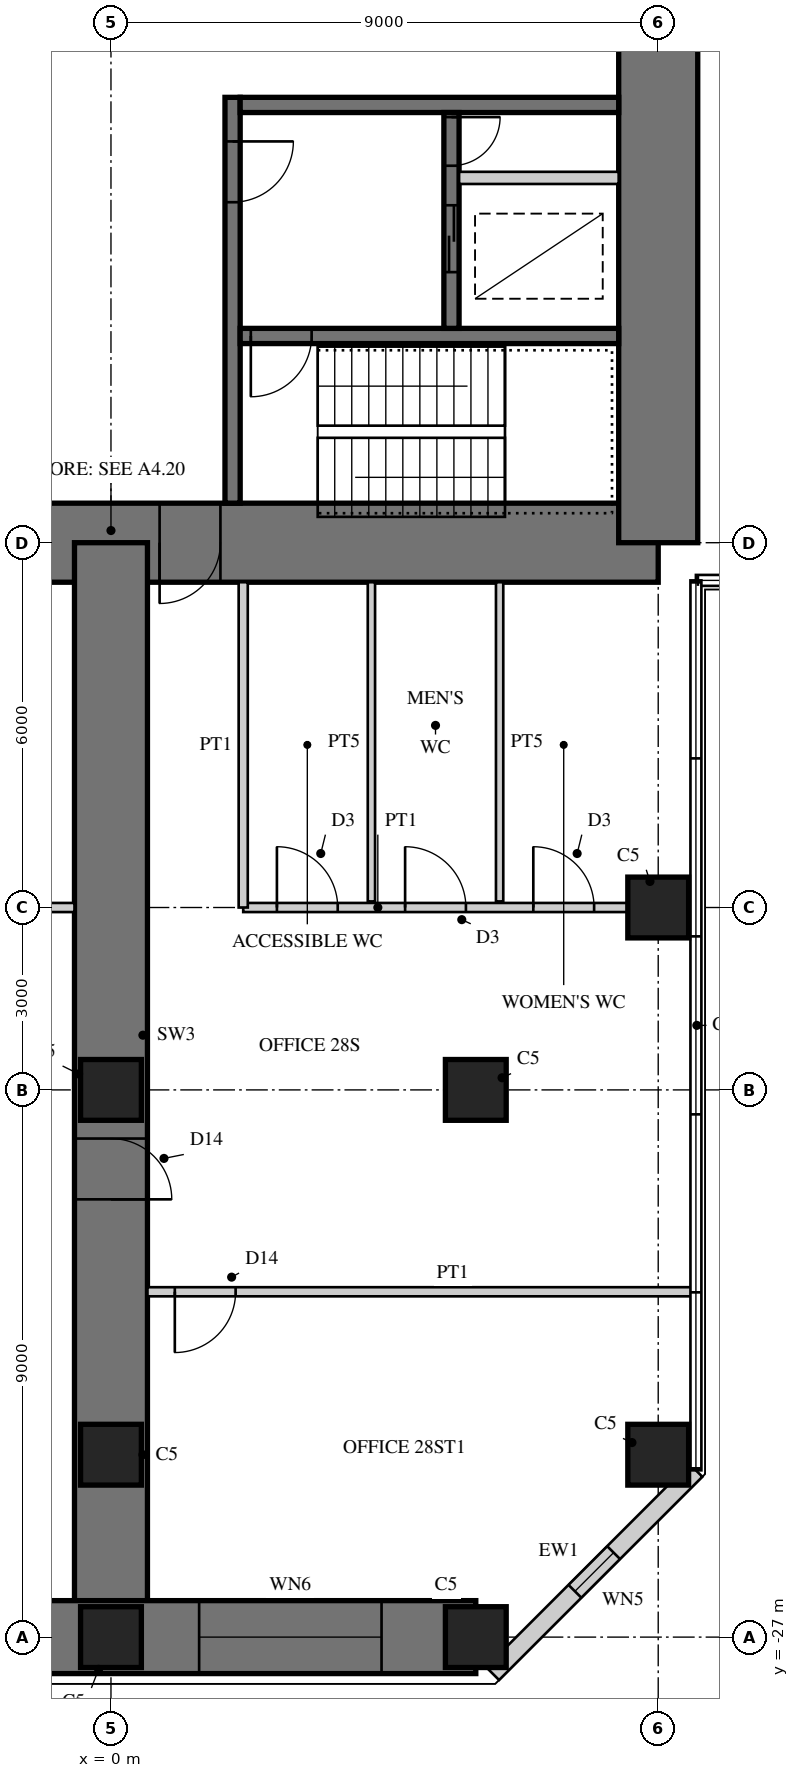
"""IFC4 building model, lengths in metres.
Left out: names, types, materials, properties, quantities, classifications, styles, units other than length and angle.
Written with IfcOpenShell. Run it as: python <this file> out.ifc"""

import sys

from ifc_helpers import new_model, si_unit, direction, frame, frame_2d, origin, origin_2d, place, context, subcontext, project, spatial, rectangle, hollow_rectangle, extrude, element, fill, save


model = new_model("IFC4")
c1 = context("Model", 3, precision=1e-05, world=origin(), true_north=direction((0.0, 1.0)))
c2 = subcontext(c1, "Body", "Model", "MODEL_VIEW")
j1 = project(units=[si_unit("LENGTHUNIT", "METRE"), si_unit("PLANEANGLEUNIT", "RADIAN")], contexts=[c1])
p1 = place(None, origin())
s1 = spatial("IfcSite", under=j1, at=p1, CompositionType="ELEMENT")
p2 = place(p1, origin())
s2 = spatial("IfcBuilding", under=s1, at=p2, CompositionType="ELEMENT")
p3 = place(p2, frame((0.0, 0.0, 116.5)))
s3 = spatial("IfcBuildingStorey", under=s2, at=p3, CompositionType="ELEMENT", Elevation=116.5)
p4 = place(p3, frame((-9.0, -9.0, 0.0), z_axis=(0.0, 0.0, 1.0), x_axis=(1.0, 0.0, 0.0)))
e1 = element("IfcWall", 1, at=p4, inside=s3, PredefinedType="SHEAR", context=c2, shape_type="SweptSolid", body=[
    extrude(rectangle(XDim=18.0, YDim=1.3, at=frame_2d((9.0, 0.0))), origin(), (0.0, 0.0, 1.0), 4.0),
])
p5 = place(p4, frame((9.8, 0.0, 0.0)))
e2 = element("IfcOpeningElement", 2, at=p5, cuts=e1, PredefinedType="OPENING", context=c2, shape_type="SweptSolid", body=[
    extrude(rectangle(XDim=1.0, YDim=2.4, at=frame_2d((0.5, 1.2))), frame((0.0, 0.66, 0.0), z_axis=(0.0, -1.0, 0.0), x_axis=(1.0, 0.0, 0.0)), (0.0, 0.0, 1.0), 1.32),
])
p6 = place(p3, frame((9.0, -9.0, 0.0), z_axis=(0.0, 0.0, 1.0), x_axis=(0.0, 1.0, 0.0)))
e3 = element("IfcWall", 3, at=p6, inside=s3, PredefinedType="SHEAR", context=c2, shape_type="SweptSolid", body=[
    extrude(rectangle(XDim=18.0, YDim=1.3, at=frame_2d((9.0, 0.0))), origin(), (0.0, 0.0, 1.0), 4.0),
])
p7 = place(p6, frame((9.8, 0.0, 0.0)))
e4 = element("IfcOpeningElement", 4, at=p7, cuts=e3, PredefinedType="OPENING", context=c2, shape_type="SweptSolid", body=[
    extrude(rectangle(XDim=1.0, YDim=2.4, at=frame_2d((0.5, 1.2))), frame((0.0, 0.66, 0.0), z_axis=(0.0, -1.0, 0.0), x_axis=(1.0, 0.0, 0.0)), (0.0, 0.0, 1.0), 1.32),
])
p8 = place(p3, frame((2.0, -1.675, 0.0), z_axis=(0.0, 0.0, 1.0), x_axis=(0.0, -1.0, 0.0)))
e5 = element("IfcWall", 5, at=p8, inside=s3, PredefinedType="SHEAR", context=c2, shape_type="SweptSolid", body=[
    extrude(rectangle(XDim=6.675, YDim=0.25, at=frame_2d((3.337, 0.0))), origin(), (0.0, 0.0, 1.0), 4.0),
])
p9 = place(p8, frame((0.725, 0.0, 0.0)))
e6 = element("IfcOpeningElement", 6, at=p9, cuts=e5, PredefinedType="OPENING", context=c2, shape_type="SweptSolid", body=[
    extrude(rectangle(XDim=1.0, YDim=2.1, at=frame_2d((0.5, 1.05))), frame((0.0, 0.135, 0.0), z_axis=(0.0, -1.0, 0.0), x_axis=(1.0, 0.0, 0.0)), (0.0, 0.0, 1.0), 0.27),
])
p10 = place(p3, frame((2.125, -1.8, 0.0), z_axis=(0.0, 0.0, 1.0), x_axis=(1.0, 0.0, 0.0)))
e7 = element("IfcWall", 7, at=p10, inside=s3, PredefinedType="SHEAR", context=c2, shape_type="SweptSolid", body=[
    extrude(rectangle(XDim=6.225, YDim=0.25, at=frame_2d((3.113, 0.0))), origin(), (0.0, 0.0, 1.0), 4.0),
])
p11 = place(p3, frame((2.125, -5.6, 0.0), z_axis=(0.0, 0.0, 1.0), x_axis=(1.0, 0.0, 0.0)))
e8 = element("IfcWall", 8, at=p11, inside=s3, PredefinedType="SHEAR", context=c2, shape_type="SweptSolid", body=[
    extrude(rectangle(XDim=6.225, YDim=0.25, at=frame_2d((3.113, 0.0))), origin(), (0.0, 0.0, 1.0), 4.0),
])
p12 = place(p11, frame((0.175, 0.0, 0.0)))
e9 = element("IfcOpeningElement", 9, at=p12, cuts=e8, PredefinedType="OPENING", context=c2, shape_type="SweptSolid", body=[
    extrude(rectangle(XDim=1.0, YDim=2.1, at=frame_2d((0.5, 1.05))), frame((0.0, 0.135, 0.0), z_axis=(0.0, -1.0, 0.0), x_axis=(1.0, 0.0, 0.0)), (0.0, 0.0, 1.0), 0.27),
])
p13 = place(p3, frame((5.6, -1.925, 0.0), z_axis=(0.0, 0.0, 1.0), x_axis=(0.0, -1.0, 0.0)))
e10 = element("IfcWall", 10, at=p13, inside=s3, PredefinedType="SHEAR", context=c2, shape_type="SweptSolid", body=[
    extrude(rectangle(XDim=3.55, YDim=0.25, at=frame_2d((1.775, 0.0))), origin(), (0.0, 0.0, 1.0), 4.0),
])
p14 = place(p13, frame((1.525, 0.0, 0.0)))
e11 = element("IfcOpeningElement", 11, at=p14, cuts=e10, PredefinedType="OPENING", context=c2, shape_type="SweptSolid", body=[
    extrude(rectangle(XDim=1.1, YDim=2.2, at=frame_2d((0.55, 1.1))), frame((0.0, 0.135, 0.0), z_axis=(0.0, -1.0, 0.0), x_axis=(1.0, 0.0, 0.0)), (0.0, 0.0, 1.0), 0.27),
])
p15 = place(p13, frame((0.075, 0.0, 0.0)))
e12 = element("IfcOpeningElement", 12, at=p15, cuts=e10, PredefinedType="OPENING", context=c2, shape_type="SweptSolid", body=[
    extrude(rectangle(XDim=0.8, YDim=2.1, at=frame_2d((0.4, 1.05))), frame((0.0, 0.135, 0.0), z_axis=(0.0, -1.0, 0.0), x_axis=(1.0, 0.0, 0.0)), (0.0, 0.0, 1.0), 0.27),
])
p16 = place(p3, frame((5.725, -3.0, 0.0), z_axis=(0.0, 0.0, 1.0), x_axis=(1.0, 0.0, 0.0)))
e13 = element("IfcWall", 13, at=p16, inside=s3, PredefinedType="PARTITIONING", context=c2, shape_type="SweptSolid", body=[
    extrude(rectangle(XDim=2.625, YDim=0.2, at=frame_2d((1.312, 0.0))), origin(), (0.0, 0.0, 1.0), 4.0),
])
p17 = place(p3, frame((0.0, -9.0, 0.0), z_axis=(0.0, 0.0, 1.0), x_axis=(0.0, -1.0, 0.0)))
e14 = element("IfcWall", 14, at=p17, inside=s3, PredefinedType="SHEAR", context=c2, shape_type="SweptSolid", body=[
    extrude(rectangle(XDim=18.0, YDim=1.2, at=frame_2d((9.0, 0.0))), origin(), (0.0, 0.0, 1.0), 4.0),
])
p18 = place(p17, frame((9.8, 0.0, 0.0)))
e15 = element("IfcOpeningElement", 15, at=p18, cuts=e14, PredefinedType="OPENING", context=c2, shape_type="SweptSolid", body=[
    extrude(rectangle(XDim=1.0, YDim=2.2, at=frame_2d((0.5, 1.1))), frame((0.0, 0.61, 0.0), z_axis=(0.0, -1.0, 0.0), x_axis=(1.0, 0.0, 0.0)), (0.0, 0.0, 1.0), 1.22),
])
p19 = place(p3, frame((-6.0, -27.0, 0.0), z_axis=(0.0, 0.0, 1.0), x_axis=(1.0, 0.0, 0.0)))
e16 = element("IfcWall", 16, at=p19, inside=s3, PredefinedType="SHEAR", context=c2, shape_type="SweptSolid", body=[
    extrude(rectangle(XDim=12.0, YDim=1.2, at=frame_2d((6.0, 0.0))), origin(), (0.0, 0.0, 1.0), 4.0),
])
p20 = place(p19, frame((1.55, 0.0, 0.6)))
e17 = element("IfcOpeningElement", 17, at=p20, cuts=e16, PredefinedType="OPENING", context=c2, shape_type="SweptSolid", body=[
    extrude(rectangle(XDim=3.0, YDim=2.4, at=frame_2d((1.5, 1.2))), frame((0.0, 0.61, 0.0), z_axis=(0.0, -1.0, 0.0), x_axis=(1.0, 0.0, 0.0)), (0.0, 0.0, 1.0), 1.22),
])
p21 = place(p19, frame((7.45, 0.0, 0.6)))
e18 = element("IfcOpeningElement", 18, at=p21, cuts=e16, PredefinedType="OPENING", context=c2, shape_type="SweptSolid", body=[
    extrude(rectangle(XDim=3.0, YDim=2.4, at=frame_2d((1.5, 1.2))), frame((0.0, 0.61, 0.0), z_axis=(0.0, -1.0, 0.0), x_axis=(1.0, 0.0, 0.0)), (0.0, 0.0, 1.0), 1.22),
])
for number, where, z_axis, x_axis in (
    (19, (9.0, -15.0, 0.0), (0.0, 0.0, 1.0), (1.0, 0.0, 0.0)),
    (20, (9.0, -24.0, 0.0), (0.0, 0.0, 1.0), (1.0, 0.0, 0.0)),
    (21, (0.0, -27.0, 0.0), (0.0, 0.0, 1.0), (1.0, 0.0, 0.0)),
    (22, (6.0, -27.0, 0.0), (0.0, 0.0, 1.0), (1.0, 0.0, 0.0)),
    (23, (0.0, -18.0, 0.0), (0.0, 0.0, 1.0), (1.0, 0.0, 0.0)),
    (24, (6.0, -18.0, 0.0), (0.0, 0.0, 1.0), (1.0, 0.0, 0.0)),
    (25, (0.0, -24.0, 0.0), (0.0, 0.0, 1.0), (1.0, 0.0, 0.0)),
):
    element("IfcColumn", number, at=place(p3, frame(where, z_axis=z_axis, x_axis=x_axis)), inside=s3, PredefinedType="COLUMN", context=c2, shape_type="SweptSolid", body=[
        extrude(rectangle(XDim=1.0, YDim=1.0, at=origin_2d()), origin(), (0.0, 0.0, 1.0), 4.0),
    ])
p22 = place(p3, frame((6.277, -27.6, 0.0), z_axis=(0.0, 0.0, 1.0), x_axis=(0.707106781187, 0.707106781187, 0.0)))
e26 = element("IfcWall", 26, at=p22, inside=s3, PredefinedType="SOLIDWALL", context=c2, shape_type="SweptSolid", body=[
    extrude(rectangle(XDim=4.728, YDim=0.3, at=frame_2d((2.364, 0.0))), origin(), (0.0, 0.0, 1.0), 3.8),
])
p23 = place(p22, frame((1.914, 0.0, 0.3)))
e27 = element("IfcOpeningElement", 27, at=p23, cuts=e26, PredefinedType="OPENING", context=c2, shape_type="SweptSolid", body=[
    extrude(rectangle(XDim=0.9, YDim=2.4, at=frame_2d((0.45, 1.2))), frame((0.0, 0.16, 0.0), z_axis=(0.0, -1.0, 0.0), x_axis=(1.0, 0.0, 0.0)), (0.0, 0.0, 1.0), 0.32),
])
p24 = place(p3, frame((2.175, -15.0, 0.0), z_axis=(0.0, 0.0, 1.0), x_axis=(1.0, 0.0, 0.0)))
e28 = element("IfcWall", 28, at=p24, inside=s3, PredefinedType="PARTITIONING", context=c2, shape_type="SweptSolid", body=[
    extrude(rectangle(XDim=6.325, YDim=0.15, at=frame_2d((3.163, 0.0))), origin(), (0.0, 0.0, 1.0), 3.0),
])
p25 = place(p24, frame((0.554, 0.0, 0.0)))
e29 = element("IfcOpeningElement", 29, at=p25, cuts=e28, PredefinedType="OPENING", context=c2, shape_type="SweptSolid", body=[
    extrude(rectangle(XDim=1.0, YDim=2.1, at=frame_2d((0.5, 1.05))), frame((0.0, 0.085, 0.0), z_axis=(0.0, -1.0, 0.0), x_axis=(1.0, 0.0, 0.0)), (0.0, 0.0, 1.0), 0.17),
])
p26 = place(p24, frame((2.663, 0.0, 0.0)))
e30 = element("IfcOpeningElement", 30, at=p26, cuts=e28, PredefinedType="OPENING", context=c2, shape_type="SweptSolid", body=[
    extrude(rectangle(XDim=1.0, YDim=2.1, at=frame_2d((0.5, 1.05))), frame((0.0, 0.085, 0.0), z_axis=(0.0, -1.0, 0.0), x_axis=(1.0, 0.0, 0.0)), (0.0, 0.0, 1.0), 0.17),
])
p27 = place(p24, frame((4.771, 0.0, 0.0)))
e31 = element("IfcOpeningElement", 31, at=p27, cuts=e28, PredefinedType="OPENING", context=c2, shape_type="SweptSolid", body=[
    extrude(rectangle(XDim=1.0, YDim=2.1, at=frame_2d((0.5, 1.05))), frame((0.0, 0.085, 0.0), z_axis=(0.0, -1.0, 0.0), x_axis=(1.0, 0.0, 0.0)), (0.0, 0.0, 1.0), 0.17),
])
p28 = place(p3, frame((2.175, -9.65, 0.0), z_axis=(0.0, 0.0, 1.0), x_axis=(0.0, -1.0, 0.0)))
e32 = element("IfcWall", 32, at=p28, inside=s3, PredefinedType="PARTITIONING", context=c2, shape_type="SweptSolid", body=[
    extrude(rectangle(XDim=5.35, YDim=0.15, at=frame_2d((2.675, 0.0))), origin(), (0.0, 0.0, 1.0), 3.8),
])
for number, where, z_axis, x_axis in (
    (33, (4.283, -9.65, 0.0), (0.0, 0.0, 1.0), (0.0, -1.0, 0.0)),
    (34, (6.392, -9.65, 0.0), (0.0, 0.0, 1.0), (0.0, -1.0, 0.0)),
):
    element("IfcWall", number, at=place(p3, frame(where, z_axis=z_axis, x_axis=x_axis)), inside=s3, PredefinedType="PLUMBINGWALL", context=c2, shape_type="SweptSolid", body=[
        extrude(rectangle(XDim=5.25, YDim=0.12, at=frame_2d((2.625, 0.0))), origin(), (0.0, 0.0, 1.0), 3.8),
    ])
p29 = place(p3, frame((-8.5, -15.0, 0.0), z_axis=(0.0, 0.0, 1.0), x_axis=(1.0, 0.0, 0.0)))
e35 = element("IfcWall", 35, at=p29, inside=s3, PredefinedType="PARTITIONING", context=c2, shape_type="SweptSolid", body=[
    extrude(rectangle(XDim=7.9, YDim=0.15, at=frame_2d((3.95, 0.0))), origin(), (0.0, 0.0, 1.0), 3.0),
])
p30 = place(p29, frame((1.45, 0.0, 0.0)))
e36 = element("IfcOpeningElement", 36, at=p30, cuts=e35, PredefinedType="OPENING", context=c2, shape_type="SweptSolid", body=[
    extrude(rectangle(XDim=1.0, YDim=2.1, at=frame_2d((0.5, 1.05))), frame((0.0, 0.085, 0.0), z_axis=(0.0, -1.0, 0.0), x_axis=(1.0, 0.0, 0.0)), (0.0, 0.0, 1.0), 0.17),
])
p31 = place(p29, frame((5.4, 0.0, 0.0)))
e37 = element("IfcOpeningElement", 37, at=p31, cuts=e35, PredefinedType="OPENING", context=c2, shape_type="SweptSolid", body=[
    extrude(rectangle(XDim=1.0, YDim=2.1, at=frame_2d((0.5, 1.05))), frame((0.0, 0.085, 0.0), z_axis=(0.0, -1.0, 0.0), x_axis=(1.0, 0.0, 0.0)), (0.0, 0.0, 1.0), 0.17),
])
p32 = place(p3, frame((0.6, -21.32, 0.0), z_axis=(0.0, 0.0, 1.0), x_axis=(1.0, 0.0, 0.0)))
e38 = element("IfcWall", 38, at=p32, inside=s3, PredefinedType="PARTITIONING", context=c2, shape_type="SweptSolid", body=[
    extrude(rectangle(XDim=8.98, YDim=0.15, at=frame_2d((4.49, 0.0))), origin(), (0.0, 0.0, 1.0), 3.8),
])
p33 = place(p32, frame((0.45, 0.0, 0.0)))
e39 = element("IfcOpeningElement", 39, at=p33, cuts=e38, PredefinedType="OPENING", context=c2, shape_type="SweptSolid", body=[
    extrude(rectangle(XDim=1.0, YDim=2.2, at=frame_2d((0.5, 1.1))), frame((0.0, 0.085, 0.0), z_axis=(0.0, -1.0, 0.0), x_axis=(1.0, 0.0, 0.0)), (0.0, 0.0, 1.0), 0.17),
])
p34 = place(p21, origin())
e40 = element("IfcWindow", 40, at=p34, inside=s3, PartitioningType="SINGLE_PANEL", PredefinedType="WINDOW", context=c2, shape_type="SweptSolid", body=[
    extrude(hollow_rectangle(XDim=3.0, YDim=2.4, WallThickness=0.06, at=frame_2d((1.5, 1.2))), frame((0.0, 0.03, 0.0), z_axis=(0.0, -1.0, 0.0), x_axis=(1.0, 0.0, 0.0)), (0.0, 0.0, 1.0), 0.06),
    extrude(rectangle(XDim=2.879, YDim=2.279, at=frame_2d((1.5, 1.2))), frame((0.0, 0.03, 0.0), z_axis=(0.0, -1.0, 0.0), x_axis=(1.0, 0.0, 0.0)), (0.0, 0.0, 1.0), 0.06),
])
fill(e18, e40)
p35 = place(p23, origin())
e41 = element("IfcWindow", 41, at=p35, inside=s3, PartitioningType="SINGLE_PANEL", PredefinedType="WINDOW", context=c2, shape_type="SweptSolid", body=[
    extrude(hollow_rectangle(XDim=0.9, YDim=2.4, WallThickness=0.06, at=frame_2d((0.45, 1.2))), frame((0.0, 0.03, 0.0), z_axis=(0.0, -1.0, 0.0), x_axis=(1.0, 0.0, 0.0)), (0.0, 0.0, 1.0), 0.06),
    extrude(rectangle(XDim=0.779, YDim=2.279, at=frame_2d((0.45, 1.2))), frame((0.0, 0.03, 0.0), z_axis=(0.0, -1.0, 0.0), x_axis=(1.0, 0.0, 0.0)), (0.0, 0.0, 1.0), 0.06),
])
fill(e27, e41)
p36 = place(p25, origin())
e42 = element("IfcDoor", 42, at=p36, inside=s3, OperationType="SINGLE_SWING_LEFT", PredefinedType="DOOR", context=c2, shape_type="SweptSolid", body=[
    extrude(rectangle(XDim=1.0, YDim=2.1, at=frame_2d((0.5, 1.05))), frame((0.0, 0.025, 0.0), z_axis=(0.0, -1.0, 0.0), x_axis=(1.0, 0.0, 0.0)), (0.0, 0.0, 1.0), 0.05),
])
fill(e29, e42)
p37 = place(p26, origin())
e43 = element("IfcDoor", 43, at=p37, inside=s3, OperationType="SINGLE_SWING_LEFT", PredefinedType="DOOR", context=c2, shape_type="SweptSolid", body=[
    extrude(rectangle(XDim=1.0, YDim=2.1, at=frame_2d((0.5, 1.05))), frame((0.0, 0.025, 0.0), z_axis=(0.0, -1.0, 0.0), x_axis=(1.0, 0.0, 0.0)), (0.0, 0.0, 1.0), 0.05),
])
fill(e30, e43)
p38 = place(p27, origin())
e44 = element("IfcDoor", 44, at=p38, inside=s3, OperationType="SINGLE_SWING_LEFT", PredefinedType="DOOR", context=c2, shape_type="SweptSolid", body=[
    extrude(rectangle(XDim=1.0, YDim=2.1, at=frame_2d((0.5, 1.05))), frame((0.0, 0.025, 0.0), z_axis=(0.0, -1.0, 0.0), x_axis=(1.0, 0.0, 0.0)), (0.0, 0.0, 1.0), 0.05),
])
fill(e31, e44)
p39 = place(p33, frame((1.0, 0.0, 0.0), z_axis=(0.0, 0.0, 1.0), x_axis=(-1.0, 0.0, 0.0)))
e45 = element("IfcDoor", 45, at=p39, inside=s3, OperationType="SINGLE_SWING_RIGHT", PredefinedType="DOOR", context=c2, shape_type="SweptSolid", body=[
    extrude(rectangle(XDim=1.0, YDim=2.2, at=frame_2d((0.5, 1.1))), frame((0.0, 0.025, 0.0), z_axis=(0.0, -1.0, 0.0), x_axis=(1.0, 0.0, 0.0)), (0.0, 0.0, 1.0), 0.05),
])
fill(e39, e45)
p40 = place(p18, origin())
e46 = element("IfcDoor", 46, at=p40, inside=s3, OperationType="SINGLE_SWING_RIGHT", PredefinedType="DOOR", context=c2, shape_type="SweptSolid", body=[
    extrude(rectangle(XDim=1.0, YDim=2.2, at=frame_2d((0.5, 1.1))), frame((0.0, 0.025, 0.0), z_axis=(0.0, -1.0, 0.0), x_axis=(1.0, 0.0, 0.0)), (0.0, 0.0, 1.0), 0.05),
])
fill(e15, e46)
p41 = place(p5, frame((1.0, 0.0, 0.0), z_axis=(0.0, 0.0, 1.0), x_axis=(-1.0, 0.0, 0.0)))
e47 = element("IfcDoor", 47, at=p41, inside=s3, OperationType="SINGLE_SWING_RIGHT", PredefinedType="DOOR", context=c2, shape_type="SweptSolid", body=[
    extrude(rectangle(XDim=1.0, YDim=2.4, at=frame_2d((0.5, 1.2))), frame((0.0, -0.005, 0.0), z_axis=(0.0, -1.0, 0.0), x_axis=(1.0, 0.0, 0.0)), (0.0, 0.0, 1.0), 0.05),
])
fill(e2, e47)
p42 = place(p9, origin())
e48 = element("IfcDoor", 48, at=p42, inside=s3, OperationType="SINGLE_SWING_LEFT", PredefinedType="DOOR", context=c2, shape_type="SweptSolid", body=[
    extrude(rectangle(XDim=1.0, YDim=2.1, at=frame_2d((0.5, 1.05))), frame((0.0, 0.025, 0.0), z_axis=(0.0, -1.0, 0.0), x_axis=(1.0, 0.0, 0.0)), (0.0, 0.0, 1.0), 0.05),
])
fill(e6, e48)
p43 = place(p12, frame((1.0, 0.0, 0.0), z_axis=(0.0, 0.0, 1.0), x_axis=(-1.0, 0.0, 0.0)))
e49 = element("IfcDoor", 49, at=p43, inside=s3, OperationType="SINGLE_SWING_RIGHT", PredefinedType="DOOR", context=c2, shape_type="SweptSolid", body=[
    extrude(rectangle(XDim=1.0, YDim=2.1, at=frame_2d((0.5, 1.05))), frame((0.0, 0.025, 0.0), z_axis=(0.0, -1.0, 0.0), x_axis=(1.0, 0.0, 0.0)), (0.0, 0.0, 1.0), 0.05),
])
fill(e9, e49)
p44 = place(p14, origin())
e50 = element("IfcDoor", 50, at=p44, inside=s3, OperationType="DOUBLE_DOOR_SLIDING", PredefinedType="DOOR", context=c2, shape_type="SweptSolid", body=[
    extrude(rectangle(XDim=1.1, YDim=2.2, at=frame_2d((0.55, 1.1))), frame((0.0, 0.025, 0.0), z_axis=(0.0, -1.0, 0.0), x_axis=(1.0, 0.0, 0.0)), (0.0, 0.0, 1.0), 0.05),
])
fill(e11, e50)
p45 = place(p15, origin())
e51 = element("IfcDoor", 51, at=p45, inside=s3, OperationType="SINGLE_SWING_LEFT", PredefinedType="DOOR", context=c2, shape_type="SweptSolid", body=[
    extrude(rectangle(XDim=0.8, YDim=2.1, at=frame_2d((0.4, 1.05))), frame((0.0, 0.025, 0.0), z_axis=(0.0, -1.0, 0.0), x_axis=(1.0, 0.0, 0.0)), (0.0, 0.0, 1.0), 0.05),
])
fill(e12, e51)
save(model, sys.argv[1])
